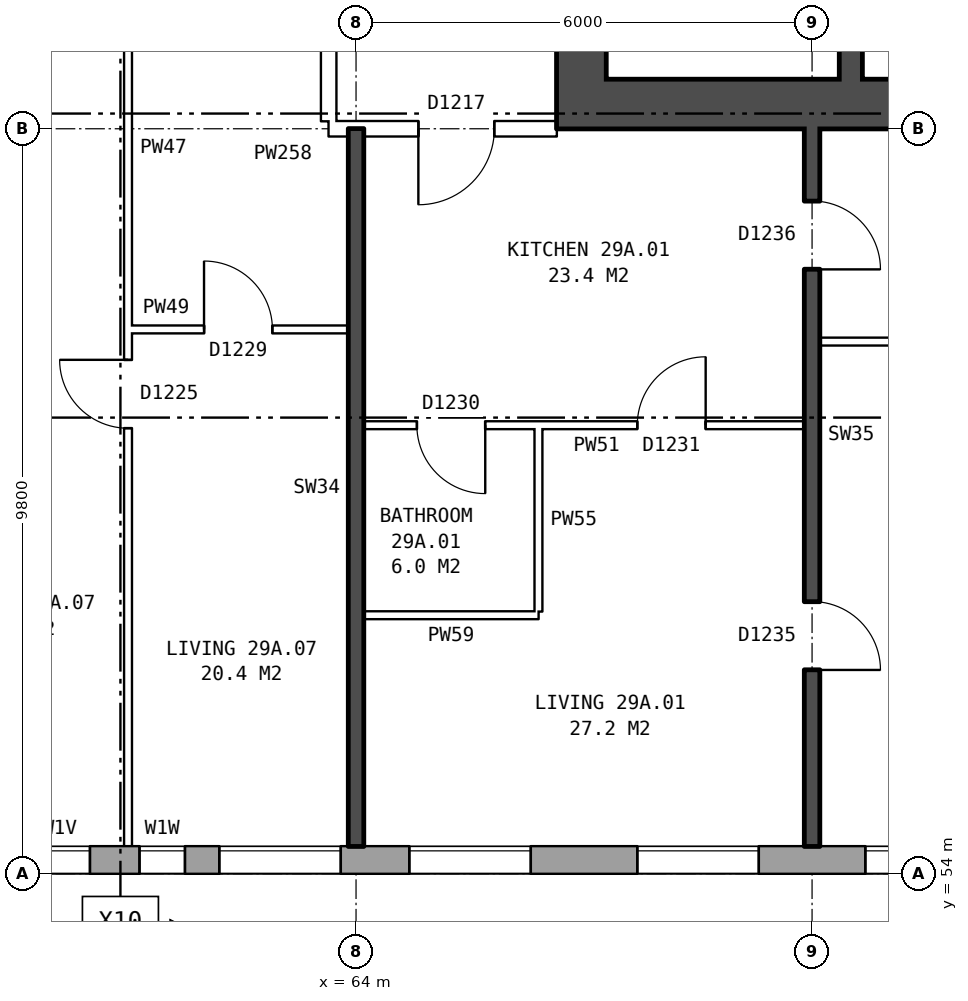
"""IFC4 building model, lengths in metres.
Left out: names, types, materials, properties, quantities, classifications, styles, units other than length and angle.
Written with IfcOpenShell. Run it as: python <this file> out.ifc"""

import sys

from ifc_helpers import new_model, si_unit, direction, frame, frame_2d, origin, place, context, subcontext, project, spatial, rectangle, extrude, element, fill, save


model = new_model("IFC4")
c1 = context("Model", 3, precision=1e-05, world=origin(), true_north=direction((0.0, 1.0)))
c2 = subcontext(c1, "Body", "Model", "MODEL_VIEW")
j1 = project(units=[si_unit("LENGTHUNIT", "METRE"), si_unit("PLANEANGLEUNIT", "RADIAN")], contexts=[c1])
p1 = place(None, origin())
s1 = spatial("IfcSite", under=j1, at=p1, CompositionType="ELEMENT")
p2 = place(p1, origin())
s2 = spatial("IfcBuilding", under=s1, at=p2, CompositionType="ELEMENT")
p3 = place(p2, frame((0.0, 0.0, 105.7)))
s3 = spatial("IfcBuildingStorey", under=s2, at=p3, CompositionType="ELEMENT", Elevation=105.7)
p4 = place(p3, frame((28.075, 54.18, 0.0), z_axis=(0.0, 0.0, 1.0), x_axis=(1.0, 0.0, 0.0)))
e1 = element("IfcWall", 1, at=p4, inside=s3, PredefinedType="STANDARD", context=c2, shape_type="SweptSolid", body=[
    extrude(rectangle(XDim=44.851, YDim=0.36, at=frame_2d((22.425, 0.0))), origin(), (0.0, 0.0, 1.0), 2.85),
])
p5 = place(p4, frame((0.625, 0.0, 0.8)))
e2 = element("IfcOpeningElement", 2, at=p5, cuts=e1, PredefinedType="OPENING", context=c2, shape_type="SweptSolid", body=[
    extrude(rectangle(XDim=1.6, YDim=1.8, at=frame_2d((0.8, 0.9))), frame((0.0, 0.19, 0.0), z_axis=(0.0, -1.0, 0.0), x_axis=(1.0, 0.0, 0.0)), (0.0, 0.0, 1.0), 0.38),
])
p6 = place(p4, frame((3.625, 0.0, 0.8)))
e3 = element("IfcOpeningElement", 3, at=p6, cuts=e1, PredefinedType="OPENING", context=c2, shape_type="SweptSolid", body=[
    extrude(rectangle(XDim=1.6, YDim=1.8, at=frame_2d((0.8, 0.9))), frame((0.0, 0.19, 0.0), z_axis=(0.0, -1.0, 0.0), x_axis=(1.0, 0.0, 0.0)), (0.0, 0.0, 1.0), 0.38),
])
p7 = place(p4, frame((6.625, 0.0, 0.8)))
e4 = element("IfcOpeningElement", 4, at=p7, cuts=e1, PredefinedType="OPENING", context=c2, shape_type="SweptSolid", body=[
    extrude(rectangle(XDim=1.6, YDim=1.8, at=frame_2d((0.8, 0.9))), frame((0.0, 0.19, 0.0), z_axis=(0.0, -1.0, 0.0), x_axis=(1.0, 0.0, 0.0)), (0.0, 0.0, 1.0), 0.38),
])
p8 = place(p4, frame((8.525, 0.0, 0.8)))
e5 = element("IfcOpeningElement", 5, at=p8, cuts=e1, PredefinedType="OPENING", context=c2, shape_type="SweptSolid", body=[
    extrude(rectangle(XDim=1.4, YDim=1.8, at=frame_2d((0.7, 0.9))), frame((0.0, 0.19, 0.0), z_axis=(0.0, -1.0, 0.0), x_axis=(1.0, 0.0, 0.0)), (0.0, 0.0, 1.0), 0.38),
])
p9 = place(p4, frame((13.175, 0.0, 0.8)))
e6 = element("IfcOpeningElement", 6, at=p9, cuts=e1, PredefinedType="OPENING", context=c2, shape_type="SweptSolid", body=[
    extrude(rectangle(XDim=1.0, YDim=0.9, at=frame_2d((0.5, 0.45))), frame((0.0, 0.19, 0.0), z_axis=(0.0, -1.0, 0.0), x_axis=(1.0, 0.0, 0.0)), (0.0, 0.0, 1.0), 0.38),
])
p10 = place(p4, frame((15.625, 0.0, 0.8)))
e7 = element("IfcOpeningElement", 7, at=p10, cuts=e1, PredefinedType="OPENING", context=c2, shape_type="SweptSolid", body=[
    extrude(rectangle(XDim=1.6, YDim=1.8, at=frame_2d((0.8, 0.9))), frame((0.0, 0.19, 0.0), z_axis=(0.0, -1.0, 0.0), x_axis=(1.0, 0.0, 0.0)), (0.0, 0.0, 1.0), 0.38),
])
p11 = place(p4, frame((18.625, 0.0, 0.8)))
e8 = element("IfcOpeningElement", 8, at=p11, cuts=e1, PredefinedType="OPENING", context=c2, shape_type="SweptSolid", body=[
    extrude(rectangle(XDim=1.6, YDim=1.8, at=frame_2d((0.8, 0.9))), frame((0.0, 0.19, 0.0), z_axis=(0.0, -1.0, 0.0), x_axis=(1.0, 0.0, 0.0)), (0.0, 0.0, 1.0), 0.38),
])
p12 = place(p4, frame((21.625, 0.0, 0.8)))
e9 = element("IfcOpeningElement", 9, at=p12, cuts=e1, PredefinedType="OPENING", context=c2, shape_type="SweptSolid", body=[
    extrude(rectangle(XDim=1.6, YDim=1.8, at=frame_2d((0.8, 0.9))), frame((0.0, 0.19, 0.0), z_axis=(0.0, -1.0, 0.0), x_axis=(1.0, 0.0, 0.0)), (0.0, 0.0, 1.0), 0.38),
])
p13 = place(p4, frame((24.625, 0.0, 0.8)))
e10 = element("IfcOpeningElement", 10, at=p13, cuts=e1, PredefinedType="OPENING", context=c2, shape_type="SweptSolid", body=[
    extrude(rectangle(XDim=1.6, YDim=1.8, at=frame_2d((0.8, 0.9))), frame((0.0, 0.19, 0.0), z_axis=(0.0, -1.0, 0.0), x_axis=(1.0, 0.0, 0.0)), (0.0, 0.0, 1.0), 0.38),
])
p14 = place(p4, frame((27.625, 0.0, 0.8)))
e11 = element("IfcOpeningElement", 11, at=p14, cuts=e1, PredefinedType="OPENING", context=c2, shape_type="SweptSolid", body=[
    extrude(rectangle(XDim=1.6, YDim=1.8, at=frame_2d((0.8, 0.9))), frame((0.0, 0.19, 0.0), z_axis=(0.0, -1.0, 0.0), x_axis=(1.0, 0.0, 0.0)), (0.0, 0.0, 1.0), 0.38),
])
p15 = place(p4, frame((30.125, 0.0, 0.15)))
e12 = element("IfcOpeningElement", 12, at=p15, cuts=e1, PredefinedType="OPENING", context=c2, shape_type="SweptSolid", body=[
    extrude(rectangle(XDim=1.2, YDim=1.8, at=frame_2d((0.6, 0.9))), frame((0.0, 0.19, 0.0), z_axis=(0.0, -1.0, 0.0), x_axis=(1.0, 0.0, 0.0)), (0.0, 0.0, 1.0), 0.38),
])
p16 = place(p4, frame((33.075, 0.0, 1.6)))
e13 = element("IfcOpeningElement", 13, at=p16, cuts=e1, PredefinedType="OPENING", context=c2, shape_type="SweptSolid", body=[
    extrude(rectangle(XDim=0.6, YDim=0.9, at=frame_2d((0.3, 0.45))), frame((0.0, 0.19, 0.0), z_axis=(0.0, -1.0, 0.0), x_axis=(1.0, 0.0, 0.0)), (0.0, 0.0, 1.0), 0.38),
])
p17 = place(p4, frame((36.625, 0.0, 0.8)))
e14 = element("IfcOpeningElement", 14, at=p17, cuts=e1, PredefinedType="OPENING", context=c2, shape_type="SweptSolid", body=[
    extrude(rectangle(XDim=1.6, YDim=1.8, at=frame_2d((0.8, 0.9))), frame((0.0, 0.19, 0.0), z_axis=(0.0, -1.0, 0.0), x_axis=(1.0, 0.0, 0.0)), (0.0, 0.0, 1.0), 0.38),
])
p18 = place(p4, frame((39.625, 0.0, 0.8)))
e15 = element("IfcOpeningElement", 15, at=p18, cuts=e1, PredefinedType="OPENING", context=c2, shape_type="SweptSolid", body=[
    extrude(rectangle(XDim=1.6, YDim=1.8, at=frame_2d((0.8, 0.9))), frame((0.0, 0.19, 0.0), z_axis=(0.0, -1.0, 0.0), x_axis=(1.0, 0.0, 0.0)), (0.0, 0.0, 1.0), 0.38),
])
p19 = place(p4, frame((42.625, 0.0, 0.8)))
e16 = element("IfcOpeningElement", 16, at=p19, cuts=e1, PredefinedType="OPENING", context=c2, shape_type="SweptSolid", body=[
    extrude(rectangle(XDim=1.6, YDim=1.8, at=frame_2d((0.8, 0.9))), frame((0.0, 0.19, 0.0), z_axis=(0.0, -1.0, 0.0), x_axis=(1.0, 0.0, 0.0)), (0.0, 0.0, 1.0), 0.38),
])
p20 = place(p4, frame((10.225, 0.0, 1.1)))
e17 = element("IfcOpeningElement", 17, at=p20, cuts=e1, PredefinedType="OPENING", context=c2, shape_type="SweptSolid", body=[
    extrude(rectangle(XDim=0.8, YDim=1.5, at=frame_2d((0.4, 0.75))), frame((0.0, 0.19, 0.0), z_axis=(0.0, -1.0, 0.0), x_axis=(1.0, 0.0, 0.0)), (0.0, 0.0, 1.0), 0.38),
])
p21 = place(p4, frame((14.475, 0.0, 0.8)))
e18 = element("IfcOpeningElement", 18, at=p21, cuts=e1, PredefinedType="OPENING", context=c2, shape_type="SweptSolid", body=[
    extrude(rectangle(XDim=0.8, YDim=1.8, at=frame_2d((0.4, 0.9))), frame((0.0, 0.19, 0.0), z_axis=(0.0, -1.0, 0.0), x_axis=(1.0, 0.0, 0.0)), (0.0, 0.0, 1.0), 0.38),
])
p22 = place(p4, frame((31.625, 0.0, 0.25)))
e19 = element("IfcOpeningElement", 19, at=p22, cuts=e1, PredefinedType="OPENING", context=c2, shape_type="SweptSolid", body=[
    extrude(rectangle(XDim=0.8, YDim=0.9, at=frame_2d((0.4, 0.45))), frame((0.0, 0.19, 0.0), z_axis=(0.0, -1.0, 0.0), x_axis=(1.0, 0.0, 0.0)), (0.0, 0.0, 1.0), 0.38),
])
p23 = place(p4, frame((34.125, 0.0, 0.8)))
e20 = element("IfcOpeningElement", 20, at=p23, cuts=e1, PredefinedType="OPENING", context=c2, shape_type="SweptSolid", body=[
    extrude(rectangle(XDim=1.6, YDim=1.8, at=frame_2d((0.8, 0.9))), frame((0.0, 0.19, 0.0), z_axis=(0.0, -1.0, 0.0), x_axis=(1.0, 0.0, 0.0)), (0.0, 0.0, 1.0), 0.38),
])
p24 = place(p3, frame((66.965, 64.45, 0.0), z_axis=(0.0, 0.0, 1.0), x_axis=(0.0, 1.0, 0.0)))
e21 = element("IfcWall", 21, at=p24, inside=s3, PredefinedType="SHEAR", context=c2, shape_type="SweptSolid", body=[
    extrude(rectangle(XDim=11.1, YDim=0.65, at=frame_2d((5.55, 0.0))), origin(), (0.0, 0.0, 1.0), 2.85),
])
p25 = place(p24, frame((0.675, 0.0, 0.0)))
e22 = element("IfcOpeningElement", 22, at=p25, cuts=e21, PredefinedType="OPENING", context=c2, shape_type="SweptSolid", body=[
    extrude(rectangle(XDim=1.1, YDim=2.1, at=frame_2d((0.55, 1.05))), frame((0.0, 0.335, 0.0), z_axis=(0.0, -1.0, 0.0), x_axis=(1.0, 0.0, 0.0)), (0.0, 0.0, 1.0), 0.67),
])
p26 = place(p24, frame((9.25, 0.0, 0.0)))
e23 = element("IfcOpeningElement", 23, at=p26, cuts=e21, PredefinedType="OPENING", context=c2, shape_type="SweptSolid", body=[
    extrude(rectangle(XDim=1.1, YDim=2.1, at=frame_2d((0.55, 1.05))), frame((0.0, 0.335, 0.0), z_axis=(0.0, -1.0, 0.0), x_axis=(1.0, 0.0, 0.0)), (0.0, 0.0, 1.0), 0.67),
])
p27 = place(p3, frame((66.64, 64.125, 0.0), z_axis=(0.0, 0.0, 1.0), x_axis=(1.0, 0.0, 0.0)))
e24 = element("IfcWall", 24, at=p27, inside=s3, PredefinedType="SHEAR", context=c2, shape_type="SweptSolid", body=[
    extrude(rectangle(XDim=9.0, YDim=0.65, at=frame_2d((4.5, 0.0))), origin(), (0.0, 0.0, 1.0), 2.85),
])
p28 = place(p3, frame((70.51, 64.45, 0.0), z_axis=(0.0, 0.0, 1.0), x_axis=(0.0, 1.0, 0.0)))
e25 = element("IfcWall", 25, at=p28, inside=s3, PredefinedType="SHEAR", context=c2, shape_type="SweptSolid", body=[
    extrude(rectangle(XDim=2.25, YDim=0.3, at=frame_2d((1.125, 0.0))), origin(), (0.0, 0.0, 1.0), 2.85),
])
p29 = place(p3, frame((63.64, 63.9, 0.0), z_axis=(0.0, 0.0, 1.0), x_axis=(0.0, 1.0, 0.0)))
e26 = element("IfcWall", 26, at=p29, inside=s3, PredefinedType="PARTITIONING", context=c2, shape_type="SweptSolid", body=[
    extrude(rectangle(XDim=12.2, YDim=0.2, at=frame_2d((6.1, 0.0))), origin(), (0.0, 0.0, 1.0), 2.85),
])
p30 = place(p29, frame((5.1, 0.0, 0.0)))
e27 = element("IfcOpeningElement", 27, at=p30, cuts=e26, PredefinedType="OPENING", context=c2, shape_type="SweptSolid", body=[
    extrude(rectangle(XDim=2.0, YDim=2.1, at=frame_2d((1.0, 1.05))), frame((0.0, 0.11, 0.0), z_axis=(0.0, -1.0, 0.0), x_axis=(1.0, 0.0, 0.0)), (0.0, 0.0, 1.0), 0.22),
])
p31 = place(p3, frame((64.1, 57.4, 0.0), z_axis=(0.0, 0.0, 1.0), x_axis=(1.0, 0.0, 0.0)))
e28 = element("IfcWall", 28, at=p31, inside=s3, PredefinedType="PARTITIONING", context=c2, shape_type="SweptSolid", body=[
    extrude(rectangle(XDim=2.3, YDim=0.1, at=frame_2d((1.15, 0.0))), origin(), (0.0, 0.0, 1.0), 2.85),
])
p32 = place(p3, frame((64.1, 59.9, 0.0), z_axis=(0.0, 0.0, 1.0), x_axis=(1.0, 0.0, 0.0)))
e29 = element("IfcWall", 29, at=p32, inside=s3, PredefinedType="PARTITIONING", context=c2, shape_type="SweptSolid", body=[
    extrude(rectangle(XDim=5.8, YDim=0.1, at=frame_2d((2.9, 0.0))), origin(), (0.0, 0.0, 1.0), 2.85),
])
p33 = place(p32, frame((3.6, 0.0, 0.0)))
e30 = element("IfcOpeningElement", 30, at=p33, cuts=e29, PredefinedType="OPENING", context=c2, shape_type="SweptSolid", body=[
    extrude(rectangle(XDim=0.9, YDim=2.1, at=frame_2d((0.45, 1.05))), frame((0.0, 0.06, 0.0), z_axis=(0.0, -1.0, 0.0), x_axis=(1.0, 0.0, 0.0)), (0.0, 0.0, 1.0), 0.12),
])
p34 = place(p32, frame((0.7, 0.0, 0.0)))
e31 = element("IfcOpeningElement", 31, at=p34, cuts=e29, PredefinedType="OPENING", context=c2, shape_type="SweptSolid", body=[
    extrude(rectangle(XDim=0.9, YDim=2.1, at=frame_2d((0.45, 1.05))), frame((0.0, 0.06, 0.0), z_axis=(0.0, -1.0, 0.0), x_axis=(1.0, 0.0, 0.0)), (0.0, 0.0, 1.0), 0.12),
])
p35 = place(p3, frame((70.1, 61.0, 0.0), z_axis=(0.0, 0.0, 1.0), x_axis=(1.0, 0.0, 0.0)))
e32 = element("IfcWall", 32, at=p35, inside=s3, PredefinedType="PARTITIONING", context=c2, shape_type="SweptSolid", body=[
    extrude(rectangle(XDim=5.54, YDim=0.1, at=frame_2d((2.77, 0.0))), origin(), (0.0, 0.0, 1.0), 2.85),
])
p36 = place(p3, frame((61.0, 61.16, 0.0), z_axis=(0.0, 0.0, 1.0), x_axis=(1.0, 0.0, 0.0)))
e33 = element("IfcWall", 33, at=p36, inside=s3, PredefinedType="PARTITIONING", context=c2, shape_type="SweptSolid", body=[
    extrude(rectangle(XDim=2.9, YDim=0.1, at=frame_2d((1.45, 0.0))), origin(), (0.0, 0.0, 1.0), 2.85),
])
p37 = place(p36, frame((1.0, 0.0, 0.0)))
e34 = element("IfcOpeningElement", 34, at=p37, cuts=e33, PredefinedType="OPENING", context=c2, shape_type="SweptSolid", body=[
    extrude(rectangle(XDim=0.9, YDim=2.1, at=frame_2d((0.45, 1.05))), frame((0.0, 0.06, 0.0), z_axis=(0.0, -1.0, 0.0), x_axis=(1.0, 0.0, 0.0)), (0.0, 0.0, 1.0), 0.12),
])
p38 = place(p3, frame((63.64, 63.8, 0.0), z_axis=(0.0, 0.0, 1.0), x_axis=(1.0, 0.0, 0.0)))
e35 = element("IfcWall", 35, at=p38, inside=s3, PredefinedType="PARTITIONING", context=c2, shape_type="SweptSolid", body=[
    extrude(rectangle(XDim=3.0, YDim=0.2, at=frame_2d((1.5, 0.0))), origin(), (0.0, 0.0, 1.0), 2.85),
])
p39 = place(p38, frame((1.18, 0.0, 0.0)))
e36 = element("IfcOpeningElement", 36, at=p39, cuts=e35, PredefinedType="OPENING", context=c2, shape_type="SweptSolid", body=[
    extrude(rectangle(XDim=1.0, YDim=2.1, at=frame_2d((0.5, 1.05))), frame((0.0, 0.11, 0.0), z_axis=(0.0, -1.0, 0.0), x_axis=(1.0, 0.0, 0.0)), (0.0, 0.0, 1.0), 0.22),
])
p40 = place(p3, frame((61.0, 54.36, 0.0), z_axis=(0.0, 0.0, 1.0), x_axis=(0.0, 1.0, 0.0)))
e37 = element("IfcWall", 37, at=p40, inside=s3, PredefinedType="PARTITIONING", context=c2, shape_type="SweptSolid", body=[
    extrude(rectangle(XDim=14.34, YDim=0.1, at=frame_2d((7.17, 0.0))), origin(), (0.0, 0.0, 1.0), 2.85),
])
p41 = place(p40, frame((5.5, 0.0, 0.0)))
e38 = element("IfcOpeningElement", 38, at=p41, cuts=e37, PredefinedType="OPENING", context=c2, shape_type="SweptSolid", body=[
    extrude(rectangle(XDim=0.9, YDim=2.1, at=frame_2d((0.45, 1.05))), frame((0.0, 0.06, 0.0), z_axis=(0.0, -1.0, 0.0), x_axis=(1.0, 0.0, 0.0)), (0.0, 0.0, 1.0), 0.12),
])
p42 = place(p40, frame((12.54, 0.0, 0.0)))
e39 = element("IfcOpeningElement", 39, at=p42, cuts=e37, PredefinedType="OPENING", context=c2, shape_type="SweptSolid", body=[
    extrude(rectangle(XDim=0.9, YDim=2.1, at=frame_2d((0.45, 1.05))), frame((0.0, 0.06, 0.0), z_axis=(0.0, -1.0, 0.0), x_axis=(1.0, 0.0, 0.0)), (0.0, 0.0, 1.0), 0.12),
])
p43 = place(p3, frame((64.0, 54.36, 0.0), z_axis=(0.0, 0.0, 1.0), x_axis=(0.0, 1.0, 0.0)))
e40 = element("IfcWall", 40, at=p43, inside=s3, PredefinedType="SOLIDWALL", context=c2, shape_type="SweptSolid", body=[
    extrude(rectangle(XDim=9.44, YDim=0.2, at=frame_2d((4.72, 0.0))), origin(), (0.0, 0.0, 1.0), 2.85),
])
p44 = place(p3, frame((66.4, 57.45, 0.0), z_axis=(0.0, 0.0, 1.0), x_axis=(0.0, 1.0, 0.0)))
e41 = element("IfcWall", 41, at=p44, inside=s3, PredefinedType="PARTITIONING", context=c2, shape_type="SweptSolid", body=[
    extrude(rectangle(XDim=2.4, YDim=0.1, at=frame_2d((1.2, 0.0))), origin(), (0.0, 0.0, 1.0), 2.85),
])
p45 = place(p3, frame((70.0, 54.36, 0.0), z_axis=(0.0, 0.0, 1.0), x_axis=(0.0, 1.0, 0.0)))
e42 = element("IfcWall", 42, at=p45, inside=s3, PredefinedType="SOLIDWALL", context=c2, shape_type="SweptSolid", body=[
    extrude(rectangle(XDim=9.44, YDim=0.2, at=frame_2d((4.72, 0.0))), origin(), (0.0, 0.0, 1.0), 2.85),
])
p46 = place(p45, frame((2.32, 0.0, 0.0)))
e43 = element("IfcOpeningElement", 43, at=p46, cuts=e42, PredefinedType="OPENING", context=c2, shape_type="SweptSolid", body=[
    extrude(rectangle(XDim=0.9, YDim=2.1, at=frame_2d((0.45, 1.05))), frame((0.0, 0.11, 0.0), z_axis=(0.0, -1.0, 0.0), x_axis=(1.0, 0.0, 0.0)), (0.0, 0.0, 1.0), 0.22),
])
p47 = place(p45, frame((7.59, 0.0, 0.0)))
e44 = element("IfcOpeningElement", 44, at=p47, cuts=e42, PredefinedType="OPENING", context=c2, shape_type="SweptSolid", body=[
    extrude(rectangle(XDim=0.9, YDim=2.1, at=frame_2d((0.45, 1.05))), frame((0.0, 0.11, 0.0), z_axis=(0.0, -1.0, 0.0), x_axis=(1.0, 0.0, 0.0)), (0.0, 0.0, 1.0), 0.22),
])
p48 = place(p16, origin())
e45 = element("IfcWindow", 45, at=p48, inside=s3, PartitioningType="SINGLE_PANEL", PredefinedType="WINDOW", context=c2, shape_type="SweptSolid", body=[
    extrude(rectangle(XDim=0.6, YDim=0.9, at=frame_2d((0.3, 0.45))), frame((0.0, 0.15, 0.0), z_axis=(0.0, -1.0, 0.0), x_axis=(1.0, 0.0, 0.0)), (0.0, 0.0, 1.0), 0.06),
])
fill(e13, e45)
p49 = place(p17, origin())
e46 = element("IfcWindow", 46, at=p49, inside=s3, PartitioningType="SINGLE_PANEL", PredefinedType="WINDOW", context=c2, shape_type="SweptSolid", body=[
    extrude(rectangle(XDim=1.6, YDim=1.8, at=frame_2d((0.8, 0.9))), frame((0.0, 0.15, 0.0), z_axis=(0.0, -1.0, 0.0), x_axis=(1.0, 0.0, 0.0)), (0.0, 0.0, 1.0), 0.06),
])
fill(e14, e46)
p50 = place(p18, origin())
e47 = element("IfcWindow", 47, at=p50, inside=s3, PartitioningType="SINGLE_PANEL", PredefinedType="WINDOW", context=c2, shape_type="SweptSolid", body=[
    extrude(rectangle(XDim=1.6, YDim=1.8, at=frame_2d((0.8, 0.9))), frame((0.0, 0.15, 0.0), z_axis=(0.0, -1.0, 0.0), x_axis=(1.0, 0.0, 0.0)), (0.0, 0.0, 1.0), 0.06),
])
fill(e15, e47)
p51 = place(p19, origin())
e48 = element("IfcWindow", 48, at=p51, inside=s3, PartitioningType="SINGLE_PANEL", PredefinedType="WINDOW", context=c2, shape_type="SweptSolid", body=[
    extrude(rectangle(XDim=1.6, YDim=1.8, at=frame_2d((0.8, 0.9))), frame((0.0, 0.15, 0.0), z_axis=(0.0, -1.0, 0.0), x_axis=(1.0, 0.0, 0.0)), (0.0, 0.0, 1.0), 0.06),
])
fill(e16, e48)
p52 = place(p46, frame((0.9, 0.0, 0.0), z_axis=(0.0, 0.0, 1.0), x_axis=(-1.0, 0.0, 0.0)))
e49 = element("IfcDoor", 49, at=p52, inside=s3, OperationType="SINGLE_SWING_RIGHT", PredefinedType="DOOR", context=c2, shape_type="SweptSolid", body=[
    extrude(rectangle(XDim=0.9, YDim=2.1, at=frame_2d((0.45, 1.05))), frame((0.0, 0.025, 0.0), z_axis=(0.0, -1.0, 0.0), x_axis=(1.0, 0.0, 0.0)), (0.0, 0.0, 1.0), 0.05),
])
fill(e43, e49)
p53 = place(p47, frame((0.9, 0.0, 0.0), z_axis=(0.0, 0.0, 1.0), x_axis=(-1.0, 0.0, 0.0)))
e50 = element("IfcDoor", 50, at=p53, inside=s3, OperationType="SINGLE_SWING_RIGHT", PredefinedType="DOOR", context=c2, shape_type="SweptSolid", body=[
    extrude(rectangle(XDim=0.9, YDim=2.1, at=frame_2d((0.45, 1.05))), frame((0.0, 0.025, 0.0), z_axis=(0.0, -1.0, 0.0), x_axis=(1.0, 0.0, 0.0)), (0.0, 0.0, 1.0), 0.05),
])
fill(e44, e50)
p54 = place(p39, frame((1.0, 0.0, 0.0), z_axis=(0.0, 0.0, 1.0), x_axis=(-1.0, 0.0, 0.0)))
e51 = element("IfcDoor", 51, at=p54, inside=s3, OperationType="SINGLE_SWING_RIGHT", PredefinedType="DOOR", context=c2, shape_type="SweptSolid", body=[
    extrude(rectangle(XDim=1.0, YDim=2.1, at=frame_2d((0.5, 1.05))), frame((0.0, 0.025, 0.0), z_axis=(0.0, -1.0, 0.0), x_axis=(1.0, 0.0, 0.0)), (0.0, 0.0, 1.0), 0.05),
])
fill(e36, e51)
p55 = place(p33, origin())
e52 = element("IfcDoor", 52, at=p55, inside=s3, OperationType="SINGLE_SWING_RIGHT", PredefinedType="DOOR", context=c2, shape_type="SweptSolid", body=[
    extrude(rectangle(XDim=0.9, YDim=2.1, at=frame_2d((0.45, 1.05))), frame((0.0, 0.025, 0.0), z_axis=(0.0, -1.0, 0.0), x_axis=(1.0, 0.0, 0.0)), (0.0, 0.0, 1.0), 0.05),
])
fill(e30, e52)
p56 = place(p34, frame((0.9, 0.0, 0.0), z_axis=(0.0, 0.0, 1.0), x_axis=(-1.0, 0.0, 0.0)))
e53 = element("IfcDoor", 53, at=p56, inside=s3, OperationType="SINGLE_SWING_LEFT", PredefinedType="DOOR", context=c2, shape_type="SweptSolid", body=[
    extrude(rectangle(XDim=0.9, YDim=2.1, at=frame_2d((0.45, 1.05))), frame((0.0, 0.025, 0.0), z_axis=(0.0, -1.0, 0.0), x_axis=(1.0, 0.0, 0.0)), (0.0, 0.0, 1.0), 0.05),
])
fill(e31, e53)
p57 = place(p41, origin())
e54 = element("IfcDoor", 54, at=p57, inside=s3, OperationType="SINGLE_SWING_RIGHT", PredefinedType="DOOR", context=c2, shape_type="SweptSolid", body=[
    extrude(rectangle(XDim=0.9, YDim=2.1, at=frame_2d((0.45, 1.05))), frame((0.0, 0.025, 0.0), z_axis=(0.0, -1.0, 0.0), x_axis=(1.0, 0.0, 0.0)), (0.0, 0.0, 1.0), 0.05),
])
fill(e38, e54)
p58 = place(p37, origin())
e55 = element("IfcDoor", 55, at=p58, inside=s3, OperationType="SINGLE_SWING_LEFT", PredefinedType="DOOR", context=c2, shape_type="SweptSolid", body=[
    extrude(rectangle(XDim=0.9, YDim=2.1, at=frame_2d((0.45, 1.05))), frame((0.0, 0.025, 0.0), z_axis=(0.0, -1.0, 0.0), x_axis=(1.0, 0.0, 0.0)), (0.0, 0.0, 1.0), 0.05),
])
fill(e34, e55)
p59 = place(p22, origin())
e56 = element("IfcWindow", 56, at=p59, inside=s3, PartitioningType="SINGLE_PANEL", PredefinedType="WINDOW", context=c2, shape_type="SweptSolid", body=[
    extrude(rectangle(XDim=0.8, YDim=0.9, at=frame_2d((0.4, 0.45))), frame((0.0, 0.15, 0.0), z_axis=(0.0, -1.0, 0.0), x_axis=(1.0, 0.0, 0.0)), (0.0, 0.0, 1.0), 0.06),
])
fill(e19, e56)
p60 = place(p23, origin())
e57 = element("IfcWindow", 57, at=p60, inside=s3, PartitioningType="SINGLE_PANEL", PredefinedType="WINDOW", context=c2, shape_type="SweptSolid", body=[
    extrude(rectangle(XDim=1.6, YDim=1.8, at=frame_2d((0.8, 0.9))), frame((0.0, 0.15, 0.0), z_axis=(0.0, -1.0, 0.0), x_axis=(1.0, 0.0, 0.0)), (0.0, 0.0, 1.0), 0.06),
])
fill(e20, e57)
save(model, sys.argv[1])
